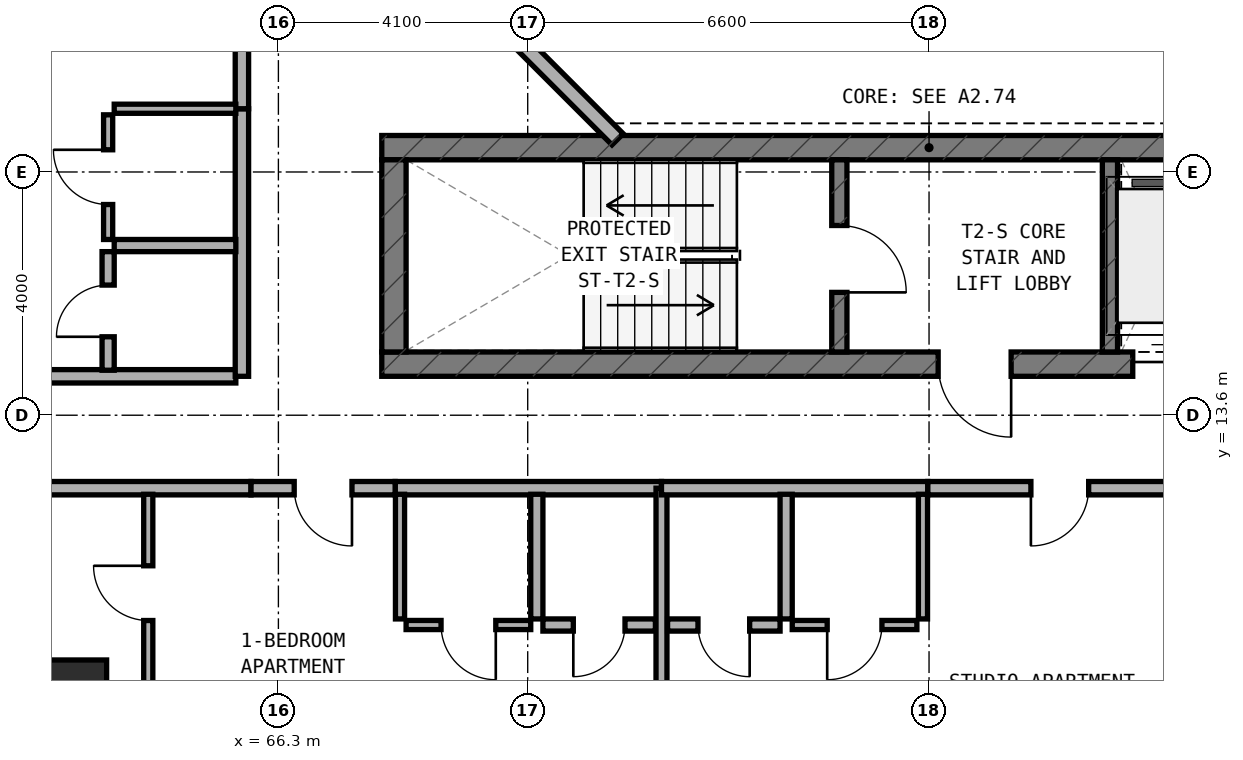
"""IFC4 building model, lengths in metres.
Left out: names, types, materials, properties, quantities, classifications, styles, units other than length and angle.
Written with IfcOpenShell. Run it as: python <this file> out.ifc"""

import sys

from ifc_helpers import new_model, si_unit, direction, frame, frame_2d, origin, origin_2d, place, context, subcontext, project, spatial, rectangle, extrude, element, fill, save


model = new_model("IFC4")
c1 = context("Model", 3, precision=1e-05, world=origin(), true_north=direction((0.0, 1.0)))
c2 = subcontext(c1, "Body", "Model", "MODEL_VIEW")
j1 = project(units=[si_unit("LENGTHUNIT", "METRE"), si_unit("PLANEANGLEUNIT", "RADIAN")], contexts=[c1])
p1 = place(None, origin())
s1 = spatial("IfcSite", under=j1, at=p1, CompositionType="ELEMENT")
p2 = place(p1, origin())
s2 = spatial("IfcBuilding", under=s1, at=p2, CompositionType="ELEMENT")
p3 = place(p2, frame((0.0, 0.0, 124.0)))
s3 = spatial("IfcBuildingStorey", under=s2, at=p3, CompositionType="ELEMENT", Elevation=124.0)
p4 = place(p3, frame((68.0, 14.44, 0.0), z_axis=(0.0, 0.0, 1.0), x_axis=(1.0, 0.0, 0.0)))
e1 = element("IfcWall", 1, at=p4, inside=s3, PredefinedType="SHEAR", context=c2, shape_type="SweptSolid", body=[
    extrude(rectangle(XDim=18.2, YDim=0.4, at=frame_2d((9.1, 0.0))), origin(), (0.0, 0.0, 1.0), 3.5),
])
p5 = place(p4, frame((9.15, 0.0, 0.0)))
e2 = element("IfcOpeningElement", 2, at=p5, cuts=e1, PredefinedType="OPENING", context=c2, shape_type="SweptSolid", body=[
    extrude(rectangle(XDim=1.2, YDim=2.15, at=frame_2d((0.6, 1.075))), frame((0.0, 0.21, 0.0), z_axis=(0.0, -1.0, 0.0), x_axis=(1.0, 0.0, 0.0)), (0.0, 0.0, 1.0), 0.42),
])
p6 = place(p4, frame((16.75, 0.0, 0.0)))
e3 = element("IfcOpeningElement", 3, at=p6, cuts=e1, PredefinedType="OPENING", context=c2, shape_type="SweptSolid", body=[
    extrude(rectangle(XDim=0.85, YDim=2.1, at=frame_2d((0.425, 1.05))), frame((0.0, 0.21, 0.0), z_axis=(0.0, -1.0, 0.0), x_axis=(1.0, 0.0, 0.0)), (0.0, 0.0, 1.0), 0.42),
])
p7 = place(p4, frame((12.35, 0.0, 0.0)))
e4 = element("IfcOpeningElement", 4, at=p7, cuts=e1, PredefinedType="OPENING", context=c2, shape_type="SweptSolid", body=[
    extrude(rectangle(XDim=1.1, YDim=2.15, at=frame_2d((0.55, 1.075))), frame((0.0, 0.21, 0.0), z_axis=(0.0, -1.0, 0.0), x_axis=(1.0, 0.0, 0.0)), (0.0, 0.0, 1.0), 0.42),
])
p8 = place(p4, frame((13.95, 0.0, 0.0)))
e5 = element("IfcOpeningElement", 5, at=p8, cuts=e1, PredefinedType="OPENING", context=c2, shape_type="SweptSolid", body=[
    extrude(rectangle(XDim=1.1, YDim=2.15, at=frame_2d((0.55, 1.075))), frame((0.0, 0.21, 0.0), z_axis=(0.0, -1.0, 0.0), x_axis=(1.0, 0.0, 0.0)), (0.0, 0.0, 1.0), 0.42),
])
p9 = place(p3, frame((68.0, 18.0, 0.0), z_axis=(0.0, 0.0, 1.0), x_axis=(1.0, 0.0, 0.0)))
e6 = element("IfcWall", 6, at=p9, inside=s3, PredefinedType="SHEAR", context=c2, shape_type="SweptSolid", body=[
    extrude(rectangle(XDim=18.2, YDim=0.4, at=frame_2d((9.1, 0.0))), origin(), (0.0, 0.0, 1.0), 3.5),
])
p10 = place(p3, frame((68.2, 14.64, 0.0), z_axis=(0.0, 0.0, 1.0), x_axis=(0.0, 1.0, 0.0)))
e7 = element("IfcWall", 7, at=p10, inside=s3, PredefinedType="SHEAR", context=c2, shape_type="SweptSolid", body=[
    extrude(rectangle(XDim=3.16, YDim=0.4, at=frame_2d((1.58, 0.0))), origin(), (0.0, 0.0, 1.0), 3.5),
])
p11 = place(p3, frame((75.525, 14.64, 0.0), z_axis=(0.0, 0.0, 1.0), x_axis=(0.0, 1.0, 0.0)))
e8 = element("IfcWall", 8, at=p11, inside=s3, PredefinedType="STANDARD", context=c2, shape_type="SweptSolid", body=[
    extrude(rectangle(XDim=3.16, YDim=0.25, at=frame_2d((1.58, 0.0))), origin(), (0.0, 0.0, 1.0), 3.25),
])
p12 = place(p11, frame((0.98, 0.0, 0.0)))
e9 = element("IfcOpeningElement", 9, at=p12, cuts=e8, PredefinedType="OPENING", context=c2, shape_type="SweptSolid", body=[
    extrude(rectangle(XDim=1.1, YDim=2.15, at=frame_2d((0.55, 1.075))), frame((0.0, 0.135, 0.0), z_axis=(0.0, -1.0, 0.0), x_axis=(1.0, 0.0, 0.0)), (0.0, 0.0, 1.0), 0.27),
])
p13 = place(p3, frame((79.975, 14.64, 0.0), z_axis=(0.0, 0.0, 1.0), x_axis=(0.0, 1.0, 0.0)))
e10 = element("IfcWall", 10, at=p13, inside=s3, PredefinedType="STANDARD", context=c2, shape_type="SweptSolid", body=[
    extrude(rectangle(XDim=3.16, YDim=0.25, at=frame_2d((1.58, 0.0))), origin(), (0.0, 0.0, 1.0), 3.25),
])
p14 = place(p3, frame((63.0, 9.0, 0.0), z_axis=(0.0, 0.0, 1.0), x_axis=(1.0, 0.0, 0.0)))
e11 = element("IfcColumn", 11, at=p14, inside=s3, PredefinedType="COLUMN", context=c2, shape_type="SweptSolid", body=[
    extrude(rectangle(XDim=0.95, YDim=1.15, at=origin_2d()), origin(), (0.0, 0.0, 1.0), 3.5),
])
p15 = place(p3, frame((70.244, 19.772, 0.0), z_axis=(0.0, 0.0, 1.0), x_axis=(0.707106781187, -0.707106781187, 0.0)))
e12 = element("IfcWall", 12, at=p15, inside=s3, PredefinedType="STANDARD", context=c2, shape_type="SweptSolid", body=[
    extrude(rectangle(XDim=2.311, YDim=0.26, at=frame_2d((1.155, 0.0))), origin(), (0.0, 0.0, 1.0), 3.25),
])
p16 = place(p3, frame((59.36, 12.4, 0.0), z_axis=(0.0, 0.0, 1.0), x_axis=(1.0, 0.0, 0.0)))
e13 = element("IfcWall", 13, at=p16, inside=s3, PredefinedType="SOLIDWALL", context=c2, shape_type="SweptSolid", body=[
    extrude(rectangle(XDim=6.49, YDim=0.22, at=frame_2d((3.245, 0.0))), origin(), (0.0, 0.0, 1.0), 2.945),
])
p17 = place(p3, frame((68.22, 12.4, 0.0), z_axis=(0.0, 0.0, 1.0), x_axis=(1.0, 0.0, 0.0)))
e14 = element("IfcWall", 14, at=p17, inside=s3, PredefinedType="SOLIDWALL", context=c2, shape_type="SweptSolid", body=[
    extrude(rectangle(XDim=4.38, YDim=0.22, at=frame_2d((2.19, 0.0))), origin(), (0.0, 0.0, 1.0), 2.825),
])
p18 = place(p3, frame((65.85, 12.4, 0.0), z_axis=(0.0, 0.0, 1.0), x_axis=(1.0, 0.0, 0.0)))
e15 = element("IfcWall", 15, at=p18, inside=s3, PredefinedType="SOLIDWALL", context=c2, shape_type="SweptSolid", body=[
    extrude(rectangle(XDim=2.37, YDim=0.22, at=frame_2d((1.185, 0.0))), origin(), (0.0, 0.0, 1.0), 3.22),
])
p19 = place(p18, frame((0.71, 0.0, 0.0)))
e16 = element("IfcOpeningElement", 16, at=p19, cuts=e15, PredefinedType="OPENING", context=c2, shape_type="SweptSolid", body=[
    extrude(rectangle(XDim=0.95, YDim=2.1, at=frame_2d((0.475, 1.05))), frame((0.0, 0.12, 0.0), z_axis=(0.0, -1.0, 0.0), x_axis=(1.0, 0.0, 0.0)), (0.0, 0.0, 1.0), 0.24),
])
p20 = place(p3, frame((64.16, 8.214, 0.0), z_axis=(0.0, 0.0, 1.0), x_axis=(0.0, 1.0, 0.0)))
e17 = element("IfcWall", 17, at=p20, inside=s3, PredefinedType="PARTITIONING", context=c2, shape_type="SweptSolid", body=[
    extrude(rectangle(XDim=4.086, YDim=0.15, at=frame_2d((2.043, 0.0))), origin(), (0.0, 0.0, 1.0), 2.945),
])
p21 = place(p20, frame((2.01, 0.0, 0.0)))
e18 = element("IfcOpeningElement", 18, at=p21, cuts=e17, PredefinedType="OPENING", context=c2, shape_type="SweptSolid", body=[
    extrude(rectangle(XDim=0.9, YDim=2.1, at=frame_2d((0.45, 1.05))), frame((0.0, 0.085, 0.0), z_axis=(0.0, -1.0, 0.0), x_axis=(1.0, 0.0, 0.0)), (0.0, 0.0, 1.0), 0.17),
])
p22 = place(p3, frame((70.55, 10.25, 0.0), z_axis=(0.0, 0.0, 1.0), x_axis=(0.0, 1.0, 0.0)))
e19 = element("IfcWall", 19, at=p22, inside=s3, PredefinedType="PLUMBINGWALL", context=c2, shape_type="SweptSolid", body=[
    extrude(rectangle(XDim=2.05, YDim=0.2, at=frame_2d((1.025, 0.0))), origin(), (0.0, 0.0, 1.0), 3.22),
])
p23 = place(p3, frame((68.3, 10.25, 0.0), z_axis=(0.0, 0.0, 1.0), x_axis=(0.0, 1.0, 0.0)))
e20 = element("IfcWall", 20, at=p23, inside=s3, PredefinedType="PARTITIONING", context=c2, shape_type="SweptSolid", body=[
    extrude(rectangle(XDim=2.05, YDim=0.15, at=frame_2d((1.025, 0.0))), origin(), (0.0, 0.0, 1.0), 3.22),
])
p24 = place(p3, frame((70.65, 10.15, 0.0), z_axis=(0.0, 0.0, 1.0), x_axis=(1.0, 0.0, 0.0)))
e21 = element("IfcWall", 21, at=p24, inside=s3, PredefinedType="PLUMBINGWALL", context=c2, shape_type="SweptSolid", body=[
    extrude(rectangle(XDim=1.85, YDim=0.2, at=frame_2d((0.925, 0.0))), origin(), (0.0, 0.0, 1.0), 3.22),
])
p25 = place(p24, frame((0.5, 0.0, 0.0)))
e22 = element("IfcOpeningElement", 22, at=p25, cuts=e21, PredefinedType="OPENING", context=c2, shape_type="SweptSolid", body=[
    extrude(rectangle(XDim=0.85, YDim=2.1, at=frame_2d((0.425, 1.05))), frame((0.0, 0.11, 0.0), z_axis=(0.0, -1.0, 0.0), x_axis=(1.0, 0.0, 0.0)), (0.0, 0.0, 1.0), 0.22),
])
p26 = place(p3, frame((68.4, 10.15, 0.0), z_axis=(0.0, 0.0, 1.0), x_axis=(1.0, 0.0, 0.0)))
e23 = element("IfcWall", 23, at=p26, inside=s3, PredefinedType="PARTITIONING", context=c2, shape_type="SweptSolid", body=[
    extrude(rectangle(XDim=2.05, YDim=0.15, at=frame_2d((1.025, 0.0))), origin(), (0.0, 0.0, 1.0), 3.22),
])
p27 = place(p26, frame((0.575, 0.0, 0.0)))
e24 = element("IfcOpeningElement", 24, at=p27, cuts=e23, PredefinedType="OPENING", context=c2, shape_type="SweptSolid", body=[
    extrude(rectangle(XDim=0.9, YDim=2.1, at=frame_2d((0.45, 1.05))), frame((0.0, 0.085, 0.0), z_axis=(0.0, -1.0, 0.0), x_axis=(1.0, 0.0, 0.0)), (0.0, 0.0, 1.0), 0.17),
])
p28 = place(p3, frame((72.6, 6.66, 0.0), z_axis=(0.0, 0.0, 1.0), x_axis=(0.0, 1.0, 0.0)))
e25 = element("IfcWall", 25, at=p28, inside=s3, PredefinedType="SOLIDWALL", context=c2, shape_type="SweptSolid", body=[
    extrude(rectangle(XDim=5.74, YDim=0.18, at=frame_2d((2.87, 0.0))), origin(), (0.0, 0.0, 1.0), 2.825),
])
p29 = place(p3, frame((72.6, 12.4, 0.0), z_axis=(0.0, 0.0, 1.0), x_axis=(1.0, 0.0, 0.0)))
e26 = element("IfcWall", 26, at=p29, inside=s3, PredefinedType="SOLIDWALL", context=c2, shape_type="SweptSolid", body=[
    extrude(rectangle(XDim=4.38, YDim=0.22, at=frame_2d((2.19, 0.0))), origin(), (0.0, 0.0, 1.0), 2.825),
])
p30 = place(p3, frame((76.98, 12.4, 0.0), z_axis=(0.0, 0.0, 1.0), x_axis=(1.0, 0.0, 0.0)))
e27 = element("IfcWall", 27, at=p30, inside=s3, PredefinedType="SOLIDWALL", context=c2, shape_type="SweptSolid", body=[
    extrude(rectangle(XDim=4.34, YDim=0.22, at=frame_2d((2.17, 0.0))), origin(), (0.0, 0.0, 1.0), 2.825),
])
p31 = place(p30, frame((1.695, 0.0, 0.0)))
e28 = element("IfcOpeningElement", 28, at=p31, cuts=e27, PredefinedType="OPENING", context=c2, shape_type="SweptSolid", body=[
    extrude(rectangle(XDim=0.95, YDim=2.1, at=frame_2d((0.475, 1.05))), frame((0.0, 0.12, 0.0), z_axis=(0.0, -1.0, 0.0), x_axis=(1.0, 0.0, 0.0)), (0.0, 0.0, 1.0), 0.24),
])
p32 = place(p3, frame((74.65, 10.25, 0.0), z_axis=(0.0, 0.0, 1.0), x_axis=(0.0, 1.0, 0.0)))
e29 = element("IfcWall", 29, at=p32, inside=s3, PredefinedType="PLUMBINGWALL", context=c2, shape_type="SweptSolid", body=[
    extrude(rectangle(XDim=2.05, YDim=0.2, at=frame_2d((1.025, 0.0))), origin(), (0.0, 0.0, 1.0), 2.985),
])
p33 = place(p3, frame((76.9, 10.25, 0.0), z_axis=(0.0, 0.0, 1.0), x_axis=(0.0, 1.0, 0.0)))
e30 = element("IfcWall", 30, at=p33, inside=s3, PredefinedType="PARTITIONING", context=c2, shape_type="SweptSolid", body=[
    extrude(rectangle(XDim=2.05, YDim=0.15, at=frame_2d((1.025, 0.0))), origin(), (0.0, 0.0, 1.0), 2.985),
])
p34 = place(p3, frame((72.7, 10.15, 0.0), z_axis=(0.0, 0.0, 1.0), x_axis=(1.0, 0.0, 0.0)))
e31 = element("IfcWall", 31, at=p34, inside=s3, PredefinedType="PLUMBINGWALL", context=c2, shape_type="SweptSolid", body=[
    extrude(rectangle(XDim=1.85, YDim=0.2, at=frame_2d((0.925, 0.0))), origin(), (0.0, 0.0, 1.0), 3.22),
])
p35 = place(p34, frame((0.5, 0.0, 0.0)))
e32 = element("IfcOpeningElement", 32, at=p35, cuts=e31, PredefinedType="OPENING", context=c2, shape_type="SweptSolid", body=[
    extrude(rectangle(XDim=0.85, YDim=2.1, at=frame_2d((0.425, 1.05))), frame((0.0, 0.11, 0.0), z_axis=(0.0, -1.0, 0.0), x_axis=(1.0, 0.0, 0.0)), (0.0, 0.0, 1.0), 0.22),
])
p36 = place(p3, frame((74.75, 10.15, 0.0), z_axis=(0.0, 0.0, 1.0), x_axis=(1.0, 0.0, 0.0)))
e33 = element("IfcWall", 33, at=p36, inside=s3, PredefinedType="PARTITIONING", context=c2, shape_type="SweptSolid", body=[
    extrude(rectangle(XDim=2.05, YDim=0.15, at=frame_2d((1.025, 0.0))), origin(), (0.0, 0.0, 1.0), 3.22),
])
p37 = place(p36, frame((0.575, 0.0, 0.0)))
e34 = element("IfcOpeningElement", 34, at=p37, cuts=e33, PredefinedType="OPENING", context=c2, shape_type="SweptSolid", body=[
    extrude(rectangle(XDim=0.9, YDim=2.1, at=frame_2d((0.45, 1.05))), frame((0.0, 0.085, 0.0), z_axis=(0.0, -1.0, 0.0), x_axis=(1.0, 0.0, 0.0)), (0.0, 0.0, 1.0), 0.17),
])
p38 = place(p3, frame((59.52, 14.24, 0.0), z_axis=(0.0, 0.0, 1.0), x_axis=(1.0, 0.0, 0.0)))
e35 = element("IfcWall", 35, at=p38, inside=s3, PredefinedType="SOLIDWALL", context=c2, shape_type="SweptSolid", body=[
    extrude(rectangle(XDim=6.08, YDim=0.22, at=frame_2d((3.04, 0.0))), origin(), (0.0, 0.0, 1.0), 2.945),
])
p39 = place(p3, frame((65.7, 14.24, 0.0), z_axis=(0.0, 0.0, 1.0), x_axis=(0.0, 1.0, 0.0)))
e36 = element("IfcWall", 36, at=p39, inside=s3, PredefinedType="SOLIDWALL", context=c2, shape_type="SweptSolid", body=[
    extrude(rectangle(XDim=4.4, YDim=0.22, at=frame_2d((2.2, 0.0))), origin(), (0.0, 0.0, 1.0), 3.22),
])
p40 = place(p3, frame((65.7, 18.64, 0.0), z_axis=(0.0, 0.0, 1.0), x_axis=(0.0, 1.0, 0.0)))
e37 = element("IfcWall", 37, at=p40, inside=s3, PredefinedType="SOLIDWALL", context=c2, shape_type="SweptSolid", body=[
    extrude(rectangle(XDim=4.86, YDim=0.22, at=frame_2d((2.43, 0.0))), origin(), (0.0, 0.0, 1.0), 2.825),
])
p41 = place(p40, frame((1.955, 0.0, 0.0)))
e38 = element("IfcOpeningElement", 38, at=p41, cuts=e37, PredefinedType="OPENING", context=c2, shape_type="SweptSolid", body=[
    extrude(rectangle(XDim=0.95, YDim=2.1, at=frame_2d((0.475, 1.05))), frame((0.0, 0.12, 0.0), z_axis=(0.0, -1.0, 0.0), x_axis=(1.0, 0.0, 0.0)), (0.0, 0.0, 1.0), 0.24),
])
p42 = place(p3, frame((63.6, 16.39, 0.0), z_axis=(0.0, 0.0, 1.0), x_axis=(1.0, 0.0, 0.0)))
e39 = element("IfcWall", 39, at=p42, inside=s3, PredefinedType="PLUMBINGWALL", context=c2, shape_type="SweptSolid", body=[
    extrude(rectangle(XDim=2.0, YDim=0.2, at=frame_2d((1.0, 0.0))), origin(), (0.0, 0.0, 1.0), 3.22),
])
p43 = place(p3, frame((63.6, 18.64, 0.0), z_axis=(0.0, 0.0, 1.0), x_axis=(1.0, 0.0, 0.0)))
e40 = element("IfcWall", 40, at=p43, inside=s3, PredefinedType="PARTITIONING", context=c2, shape_type="SweptSolid", body=[
    extrude(rectangle(XDim=2.0, YDim=0.15, at=frame_2d((1.0, 0.0))), origin(), (0.0, 0.0, 1.0), 3.22),
])
p44 = place(p3, frame((63.5, 14.34, 0.0), z_axis=(0.0, 0.0, 1.0), x_axis=(0.0, 1.0, 0.0)))
e41 = element("IfcWall", 41, at=p44, inside=s3, PredefinedType="PLUMBINGWALL", context=c2, shape_type="SweptSolid", body=[
    extrude(rectangle(XDim=1.95, YDim=0.2, at=frame_2d((0.975, 0.0))), origin(), (0.0, 0.0, 1.0), 3.22),
])
p45 = place(p44, frame((0.55, 0.0, 0.0)))
e42 = element("IfcOpeningElement", 42, at=p45, cuts=e41, PredefinedType="OPENING", context=c2, shape_type="SweptSolid", body=[
    extrude(rectangle(XDim=0.85, YDim=2.1, at=frame_2d((0.425, 1.05))), frame((0.0, 0.11, 0.0), z_axis=(0.0, -1.0, 0.0), x_axis=(1.0, 0.0, 0.0)), (0.0, 0.0, 1.0), 0.22),
])
p46 = place(p3, frame((63.5, 16.49, 0.0), z_axis=(0.0, 0.0, 1.0), x_axis=(0.0, 1.0, 0.0)))
e43 = element("IfcWall", 43, at=p46, inside=s3, PredefinedType="PARTITIONING", context=c2, shape_type="SweptSolid", body=[
    extrude(rectangle(XDim=2.05, YDim=0.15, at=frame_2d((1.025, 0.0))), origin(), (0.0, 0.0, 1.0), 3.22),
])
p47 = place(p46, frame((0.575, 0.0, 0.0)))
e44 = element("IfcOpeningElement", 44, at=p47, cuts=e43, PredefinedType="OPENING", context=c2, shape_type="SweptSolid", body=[
    extrude(rectangle(XDim=0.9, YDim=2.1, at=frame_2d((0.45, 1.05))), frame((0.0, 0.085, 0.0), z_axis=(0.0, -1.0, 0.0), x_axis=(1.0, 0.0, 0.0)), (0.0, 0.0, 1.0), 0.17),
])
p48 = place(p12, frame((1.1, 0.0, 0.0), z_axis=(0.0, 0.0, 1.0), x_axis=(-1.0, 0.0, 0.0)))
e45 = element("IfcDoor", 45, at=p48, inside=s3, OperationType="SINGLE_SWING_RIGHT", PredefinedType="DOOR", context=c2, shape_type="SweptSolid", body=[
    extrude(rectangle(XDim=1.1, YDim=2.15, at=frame_2d((0.55, 1.075))), frame((0.0, 0.025, 0.0), z_axis=(0.0, -1.0, 0.0), x_axis=(1.0, 0.0, 0.0)), (0.0, 0.0, 1.0), 0.05),
])
fill(e9, e45)
p49 = place(p5, frame((1.2, 0.0, 0.0), z_axis=(0.0, 0.0, 1.0), x_axis=(-1.0, 0.0, 0.0)))
e46 = element("IfcDoor", 46, at=p49, inside=s3, OperationType="SINGLE_SWING_LEFT", PredefinedType="DOOR", context=c2, shape_type="SweptSolid", body=[
    extrude(rectangle(XDim=1.2, YDim=2.15, at=frame_2d((0.6, 1.075))), frame((0.0, 0.025, 0.0), z_axis=(0.0, -1.0, 0.0), x_axis=(1.0, 0.0, 0.0)), (0.0, 0.0, 1.0), 0.05),
])
fill(e2, e46)
p50 = place(p7, frame((1.1, 0.0, 0.0), z_axis=(0.0, 0.0, 1.0), x_axis=(-1.0, 0.0, 0.0)))
e47 = element("IfcDoor", 47, at=p50, inside=s3, OperationType="DOUBLE_DOOR_SLIDING", PredefinedType="DOOR", context=c2, shape_type="SweptSolid", body=[
    extrude(rectangle(XDim=1.1, YDim=2.15, at=frame_2d((0.55, 1.075))), frame((0.0, 0.025, 0.0), z_axis=(0.0, -1.0, 0.0), x_axis=(1.0, 0.0, 0.0)), (0.0, 0.0, 1.0), 0.05),
])
fill(e4, e47)
p51 = place(p19, frame((0.95, 0.0, 0.0), z_axis=(0.0, 0.0, 1.0), x_axis=(-1.0, 0.0, 0.0)))
e48 = element("IfcDoor", 48, at=p51, inside=s3, OperationType="SINGLE_SWING_LEFT", PredefinedType="DOOR", context=c2, shape_type="SweptSolid", body=[
    extrude(rectangle(XDim=0.95, YDim=2.1, at=frame_2d((0.475, 1.05))), frame((0.0, 0.025, 0.0), z_axis=(0.0, -1.0, 0.0), x_axis=(1.0, 0.0, 0.0)), (0.0, 0.0, 1.0), 0.05),
])
fill(e16, e48)
p52 = place(p21, origin())
e49 = element("IfcDoor", 49, at=p52, inside=s3, OperationType="SINGLE_SWING_RIGHT", PredefinedType="DOOR", context=c2, shape_type="SweptSolid", body=[
    extrude(rectangle(XDim=0.9, YDim=2.1, at=frame_2d((0.45, 1.05))), frame((0.0, 0.025, 0.0), z_axis=(0.0, -1.0, 0.0), x_axis=(1.0, 0.0, 0.0)), (0.0, 0.0, 1.0), 0.05),
])
fill(e18, e49)
p53 = place(p25, frame((0.85, 0.0, 0.0), z_axis=(0.0, 0.0, 1.0), x_axis=(-1.0, 0.0, 0.0)))
e50 = element("IfcDoor", 50, at=p53, inside=s3, OperationType="SINGLE_SWING_RIGHT", PredefinedType="DOOR", context=c2, shape_type="SweptSolid", body=[
    extrude(rectangle(XDim=0.85, YDim=2.1, at=frame_2d((0.425, 1.05))), frame((0.0, 0.025, 0.0), z_axis=(0.0, -1.0, 0.0), x_axis=(1.0, 0.0, 0.0)), (0.0, 0.0, 1.0), 0.05),
])
fill(e22, e50)
p54 = place(p27, frame((0.9, 0.0, 0.0), z_axis=(0.0, 0.0, 1.0), x_axis=(-1.0, 0.0, 0.0)))
e51 = element("IfcDoor", 51, at=p54, inside=s3, OperationType="SINGLE_SWING_LEFT", PredefinedType="DOOR", context=c2, shape_type="SweptSolid", body=[
    extrude(rectangle(XDim=0.9, YDim=2.1, at=frame_2d((0.45, 1.05))), frame((0.0, 0.025, 0.0), z_axis=(0.0, -1.0, 0.0), x_axis=(1.0, 0.0, 0.0)), (0.0, 0.0, 1.0), 0.05),
])
fill(e24, e51)
p55 = place(p31, frame((0.95, 0.0, 0.0), z_axis=(0.0, 0.0, 1.0), x_axis=(-1.0, 0.0, 0.0)))
e52 = element("IfcDoor", 52, at=p55, inside=s3, OperationType="SINGLE_SWING_RIGHT", PredefinedType="DOOR", context=c2, shape_type="SweptSolid", body=[
    extrude(rectangle(XDim=0.95, YDim=2.1, at=frame_2d((0.475, 1.05))), frame((0.0, 0.025, 0.0), z_axis=(0.0, -1.0, 0.0), x_axis=(1.0, 0.0, 0.0)), (0.0, 0.0, 1.0), 0.05),
])
fill(e28, e52)
p56 = place(p35, frame((0.85, 0.0, 0.0), z_axis=(0.0, 0.0, 1.0), x_axis=(-1.0, 0.0, 0.0)))
e53 = element("IfcDoor", 53, at=p56, inside=s3, OperationType="SINGLE_SWING_LEFT", PredefinedType="DOOR", context=c2, shape_type="SweptSolid", body=[
    extrude(rectangle(XDim=0.85, YDim=2.1, at=frame_2d((0.425, 1.05))), frame((0.0, 0.025, 0.0), z_axis=(0.0, -1.0, 0.0), x_axis=(1.0, 0.0, 0.0)), (0.0, 0.0, 1.0), 0.05),
])
fill(e32, e53)
p57 = place(p37, frame((0.9, 0.0, 0.0), z_axis=(0.0, 0.0, 1.0), x_axis=(-1.0, 0.0, 0.0)))
e54 = element("IfcDoor", 54, at=p57, inside=s3, OperationType="SINGLE_SWING_RIGHT", PredefinedType="DOOR", context=c2, shape_type="SweptSolid", body=[
    extrude(rectangle(XDim=0.9, YDim=2.1, at=frame_2d((0.45, 1.05))), frame((0.0, 0.025, 0.0), z_axis=(0.0, -1.0, 0.0), x_axis=(1.0, 0.0, 0.0)), (0.0, 0.0, 1.0), 0.05),
])
fill(e34, e54)
p58 = place(p45, origin())
e55 = element("IfcDoor", 55, at=p58, inside=s3, OperationType="SINGLE_SWING_LEFT", PredefinedType="DOOR", context=c2, shape_type="SweptSolid", body=[
    extrude(rectangle(XDim=0.85, YDim=2.1, at=frame_2d((0.425, 1.05))), frame((0.0, 0.025, 0.0), z_axis=(0.0, -1.0, 0.0), x_axis=(1.0, 0.0, 0.0)), (0.0, 0.0, 1.0), 0.05),
])
fill(e42, e55)
p59 = place(p47, origin())
e56 = element("IfcDoor", 56, at=p59, inside=s3, OperationType="SINGLE_SWING_RIGHT", PredefinedType="DOOR", context=c2, shape_type="SweptSolid", body=[
    extrude(rectangle(XDim=0.9, YDim=2.1, at=frame_2d((0.45, 1.05))), frame((0.0, 0.025, 0.0), z_axis=(0.0, -1.0, 0.0), x_axis=(1.0, 0.0, 0.0)), (0.0, 0.0, 1.0), 0.05),
])
fill(e44, e56)
save(model, sys.argv[1])
